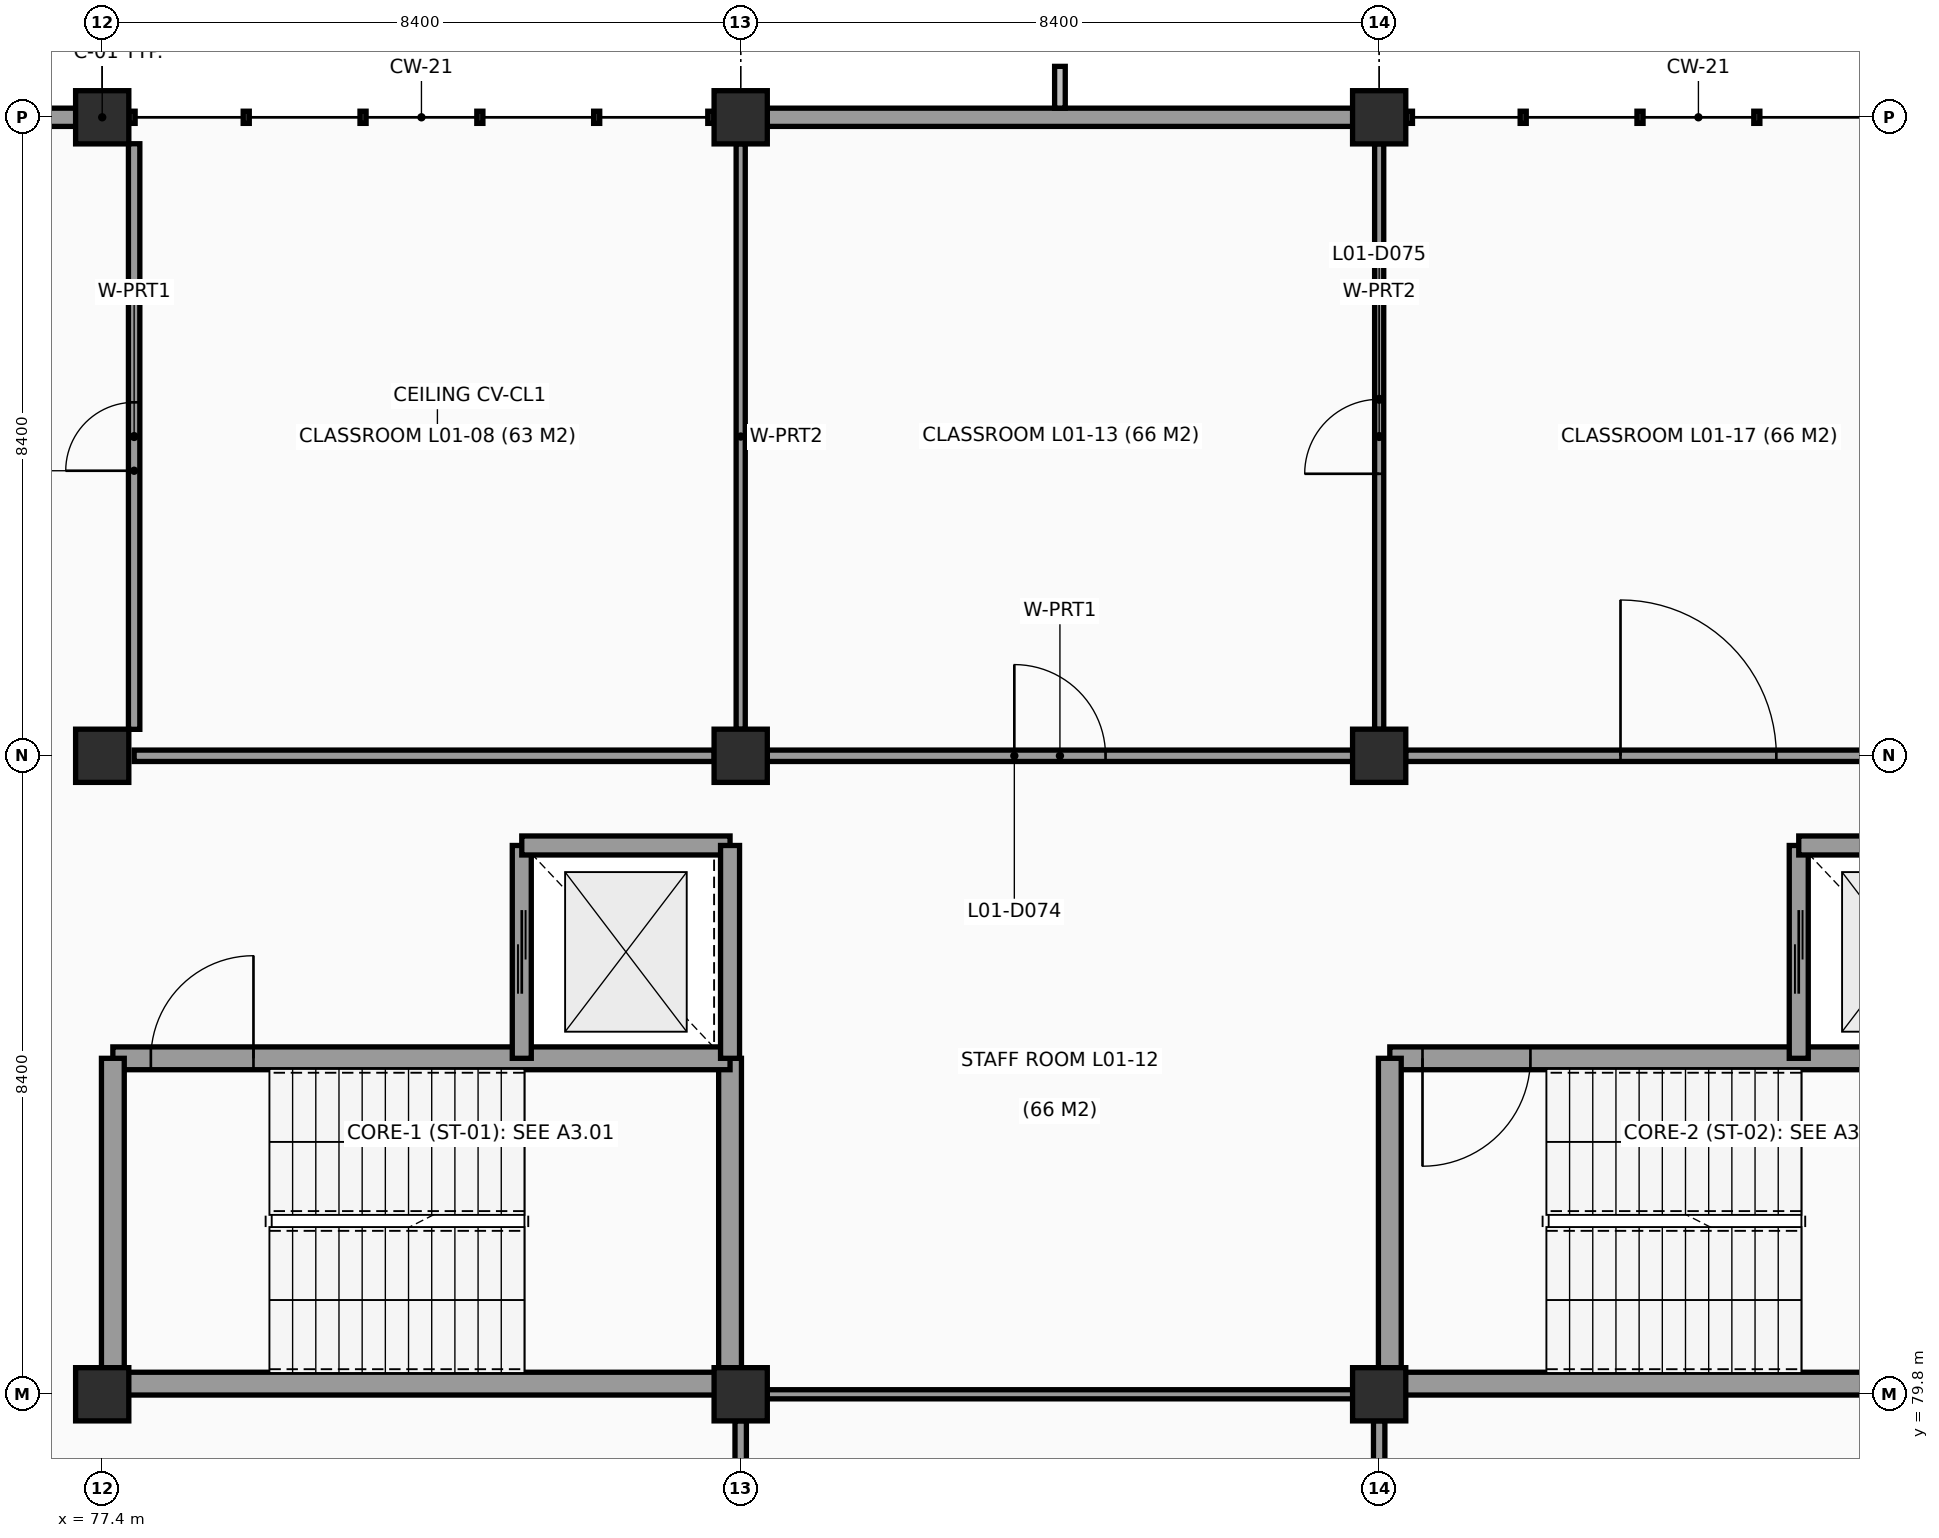
"""IFC4 building model, lengths in metres.
Left out: names, types, materials, properties, quantities, classifications, styles, units other than length and angle.
Written with IfcOpenShell. Run it as: python <this file> out.ifc"""

import sys

from ifc_helpers import new_model, si_unit, direction, frame, frame_2d, origin, origin_2d, place, context, subcontext, project, spatial, rectangle, extrude, element, fill, save


model = new_model("IFC4")
c1 = context("Model", 3, precision=1e-05, world=origin(), true_north=direction((0.0, 1.0)))
c2 = subcontext(c1, "Body", "Model", "MODEL_VIEW")
j1 = project(units=[si_unit("LENGTHUNIT", "METRE"), si_unit("PLANEANGLEUNIT", "RADIAN")], contexts=[c1])
p1 = place(None, origin())
s1 = spatial("IfcSite", under=j1, at=p1, CompositionType="ELEMENT")
p2 = place(p1, origin())
s2 = spatial("IfcBuilding", under=s1, at=p2, CompositionType="ELEMENT")
p3 = place(p2, frame((0.0, 0.0, 4.2)))
s3 = spatial("IfcBuildingStorey", under=s2, at=p3, CompositionType="ELEMENT", Elevation=4.2)
for number, where, z_axis, x_axis in (
    (1, (77.4, 79.8, 0.0), (0.0, 0.0, 1.0), (1.0, 0.0, 0.0)),
    (2, (77.4, 88.2, 0.0), (0.0, 0.0, 1.0), (1.0, 0.0, 0.0)),
    (3, (77.4, 96.6, 0.0), (0.0, 0.0, 1.0), (1.0, 0.0, 0.0)),
    (4, (85.8, 79.8, 0.0), (0.0, 0.0, 1.0), (1.0, 0.0, 0.0)),
    (5, (85.8, 88.2, 0.0), (0.0, 0.0, 1.0), (1.0, 0.0, 0.0)),
    (6, (85.8, 96.6, 0.0), (0.0, 0.0, 1.0), (1.0, 0.0, 0.0)),
    (7, (94.2, 79.8, 0.0), (0.0, 0.0, 1.0), (1.0, 0.0, 0.0)),
    (8, (94.2, 88.2, 0.0), (0.0, 0.0, 1.0), (1.0, 0.0, 0.0)),
    (9, (94.2, 96.6, 0.0), (0.0, 0.0, 1.0), (1.0, 0.0, 0.0)),
):
    element("IfcColumn", number, at=place(p3, frame(where, z_axis=z_axis, x_axis=x_axis)), inside=s3, PredefinedType="COLUMN", context=c2, shape_type="SweptSolid", body=[
        extrude(rectangle(XDim=0.7, YDim=0.7, at=origin_2d()), origin(), (0.0, 0.0, 1.0), 3.6),
    ])
p4 = place(p3, frame((74.723, 96.6, 0.0), z_axis=(0.0, 0.0, 1.0), x_axis=(1.0, 0.0, 0.0)))
e10 = element("IfcWall", 10, at=p4, inside=s3, PredefinedType="SOLIDWALL", context=c2, shape_type="SweptSolid", body=[
    extrude(rectangle(XDim=2.329, YDim=0.24, at=frame_2d((1.165, 0.0))), origin(), (0.0, 0.0, 1.0), 2.77),
])
p5 = place(p3, frame((86.148, 96.6, 0.0), z_axis=(0.0, 0.0, 1.0), x_axis=(1.0, 0.0, 0.0)))
e11 = element("IfcWall", 11, at=p5, inside=s3, PredefinedType="SOLIDWALL", context=c2, shape_type="SweptSolid", body=[
    extrude(rectangle(XDim=7.704, YDim=0.24, at=frame_2d((3.852, 0.0))), origin(), (0.0, 0.0, 1.0), 2.57),
])
p6 = place(p3, frame((77.54, 79.94, 0.0), z_axis=(0.0, 0.0, 1.0), x_axis=(1.0, 0.0, 0.0)))
e12 = element("IfcWall", 12, at=p6, inside=s3, PredefinedType="SHEAR", context=c2, shape_type="SweptSolid", body=[
    extrude(rectangle(XDim=8.12, YDim=0.3, at=frame_2d((4.06, 0.0))), origin(), (0.0, 0.0, 1.0), 3.6),
])
p7 = place(p3, frame((85.66, 79.94, 0.0), z_axis=(0.0, 0.0, 1.0), x_axis=(0.0, 1.0, 0.0)))
e13 = element("IfcWall", 13, at=p7, inside=s3, PredefinedType="SHEAR", context=c2, shape_type="SweptSolid", body=[
    extrude(rectangle(XDim=4.28, YDim=0.3, at=frame_2d((2.14, 0.0))), origin(), (0.0, 0.0, 1.0), 3.6),
])
p8 = place(p3, frame((85.66, 84.22, 0.0), z_axis=(0.0, 0.0, 1.0), x_axis=(-1.0, 0.0, 0.0)))
e14 = element("IfcWall", 14, at=p8, inside=s3, PredefinedType="SHEAR", context=c2, shape_type="SweptSolid", body=[
    extrude(rectangle(XDim=8.12, YDim=0.3, at=frame_2d((4.06, 0.0))), origin(), (0.0, 0.0, 1.0), 3.6),
])
p9 = place(p8, frame((6.27, 0.0, 0.0)))
e15 = element("IfcOpeningElement", 15, at=p9, cuts=e14, PredefinedType="OPENING", context=c2, shape_type="SweptSolid", body=[
    extrude(rectangle(XDim=1.35, YDim=2.15, at=frame_2d((0.675, 1.075))), frame((0.0, 0.16, 0.0), z_axis=(0.0, -1.0, 0.0), x_axis=(1.0, 0.0, 0.0)), (0.0, 0.0, 1.0), 0.32),
])
p10 = place(p3, frame((77.54, 84.22, 0.0), z_axis=(0.0, 0.0, 1.0), x_axis=(0.0, -1.0, 0.0)))
e16 = element("IfcWall", 16, at=p10, inside=s3, PredefinedType="SHEAR", context=c2, shape_type="SweptSolid", body=[
    extrude(rectangle(XDim=4.28, YDim=0.3, at=frame_2d((2.14, 0.0))), origin(), (0.0, 0.0, 1.0), 3.6),
])
p11 = place(p3, frame((82.92, 87.02, 0.0), z_axis=(0.0, 0.0, 1.0), x_axis=(0.0, -1.0, 0.0)))
e17 = element("IfcWall", 17, at=p11, inside=s3, PredefinedType="SHEAR", context=c2, shape_type="SweptSolid", body=[
    extrude(rectangle(XDim=2.8, YDim=0.25, at=frame_2d((1.4, 0.0))), origin(), (0.0, 0.0, 1.0), 3.6),
])
p12 = place(p11, frame((0.85, 0.0, 0.0)))
e18 = element("IfcOpeningElement", 18, at=p12, cuts=e17, PredefinedType="OPENING", context=c2, shape_type="SweptSolid", body=[
    extrude(rectangle(XDim=1.1, YDim=2.15, at=frame_2d((0.55, 1.075))), frame((0.0, 0.135, 0.0), z_axis=(0.0, -1.0, 0.0), x_axis=(1.0, 0.0, 0.0)), (0.0, 0.0, 1.0), 0.27),
])
p13 = place(p3, frame((85.66, 87.02, 0.0), z_axis=(0.0, 0.0, 1.0), x_axis=(-1.0, 0.0, 0.0)))
e19 = element("IfcWall", 19, at=p13, inside=s3, PredefinedType="SHEAR", context=c2, shape_type="SweptSolid", body=[
    extrude(rectangle(XDim=2.74, YDim=0.25, at=frame_2d((1.37, 0.0))), origin(), (0.0, 0.0, 1.0), 3.6),
])
p14 = place(p3, frame((85.66, 84.22, 0.0), z_axis=(0.0, 0.0, 1.0), x_axis=(0.0, 1.0, 0.0)))
e20 = element("IfcWall", 20, at=p14, inside=s3, PredefinedType="SHEAR", context=c2, shape_type="SweptSolid", body=[
    extrude(rectangle(XDim=2.8, YDim=0.25, at=frame_2d((1.4, 0.0))), origin(), (0.0, 0.0, 1.0), 3.6),
])
p15 = place(p3, frame((94.34, 79.94, 0.0), z_axis=(0.0, 0.0, 1.0), x_axis=(1.0, 0.0, 0.0)))
e21 = element("IfcWall", 21, at=p15, inside=s3, PredefinedType="SHEAR", context=c2, shape_type="SweptSolid", body=[
    extrude(rectangle(XDim=8.12, YDim=0.3, at=frame_2d((4.06, 0.0))), origin(), (0.0, 0.0, 1.0), 3.6),
])
p16 = place(p3, frame((102.46, 84.22, 0.0), z_axis=(0.0, 0.0, 1.0), x_axis=(-1.0, 0.0, 0.0)))
e22 = element("IfcWall", 22, at=p16, inside=s3, PredefinedType="SHEAR", context=c2, shape_type="SweptSolid", body=[
    extrude(rectangle(XDim=8.12, YDim=0.3, at=frame_2d((4.06, 0.0))), origin(), (0.0, 0.0, 1.0), 3.6),
])
p17 = place(p16, frame((6.27, 0.0, 0.0)))
e23 = element("IfcOpeningElement", 23, at=p17, cuts=e22, PredefinedType="OPENING", context=c2, shape_type="SweptSolid", body=[
    extrude(rectangle(XDim=1.42, YDim=2.15, at=frame_2d((0.71, 1.075))), frame((0.0, 0.16, 0.0), z_axis=(0.0, -1.0, 0.0), x_axis=(1.0, 0.0, 0.0)), (0.0, 0.0, 1.0), 0.32),
])
p18 = place(p3, frame((94.34, 84.22, 0.0), z_axis=(0.0, 0.0, 1.0), x_axis=(0.0, -1.0, 0.0)))
e24 = element("IfcWall", 24, at=p18, inside=s3, PredefinedType="SHEAR", context=c2, shape_type="SweptSolid", body=[
    extrude(rectangle(XDim=4.28, YDim=0.3, at=frame_2d((2.14, 0.0))), origin(), (0.0, 0.0, 1.0), 3.6),
])
p19 = place(p3, frame((99.72, 87.02, 0.0), z_axis=(0.0, 0.0, 1.0), x_axis=(0.0, -1.0, 0.0)))
e25 = element("IfcWall", 25, at=p19, inside=s3, PredefinedType="SHEAR", context=c2, shape_type="SweptSolid", body=[
    extrude(rectangle(XDim=2.8, YDim=0.25, at=frame_2d((1.4, 0.0))), origin(), (0.0, 0.0, 1.0), 3.6),
])
p20 = place(p19, frame((0.85, 0.0, 0.0)))
e26 = element("IfcOpeningElement", 26, at=p20, cuts=e25, PredefinedType="OPENING", context=c2, shape_type="SweptSolid", body=[
    extrude(rectangle(XDim=1.1, YDim=2.15, at=frame_2d((0.55, 1.075))), frame((0.0, 0.135, 0.0), z_axis=(0.0, -1.0, 0.0), x_axis=(1.0, 0.0, 0.0)), (0.0, 0.0, 1.0), 0.27),
])
p21 = place(p3, frame((102.46, 87.02, 0.0), z_axis=(0.0, 0.0, 1.0), x_axis=(-1.0, 0.0, 0.0)))
e27 = element("IfcWall", 27, at=p21, inside=s3, PredefinedType="SHEAR", context=c2, shape_type="SweptSolid", body=[
    extrude(rectangle(XDim=2.74, YDim=0.25, at=frame_2d((1.37, 0.0))), origin(), (0.0, 0.0, 1.0), 3.6),
])
p22 = place(p3, frame((77.82, 88.548, 0.0), z_axis=(0.0, 0.0, 1.0), x_axis=(0.0, 1.0, 0.0)))
e28 = element("IfcWall", 28, at=p22, inside=s3, PredefinedType="PARTITIONING", context=c2, shape_type="SweptSolid", body=[
    extrude(rectangle(XDim=7.704, YDim=0.15, at=frame_2d((3.852, 0.0))), origin(), (0.0, 0.0, 1.0), 2.82),
])
p23 = place(p22, frame((3.402, 0.0, 0.0)))
e29 = element("IfcOpeningElement", 29, at=p23, cuts=e28, PredefinedType="OPENING", context=c2, shape_type="SweptSolid", body=[
    extrude(rectangle(XDim=0.9, YDim=2.05, at=frame_2d((0.45, 1.025))), frame((0.0, 0.085, 0.0), z_axis=(0.0, -1.0, 0.0), x_axis=(1.0, 0.0, 0.0)), (0.0, 0.0, 1.0), 0.17),
])
p24 = place(p3, frame((85.8, 96.252, 0.0), z_axis=(0.0, 0.0, 1.0), x_axis=(0.0, -1.0, 0.0)))
e30 = element("IfcWall", 30, at=p24, inside=s3, PredefinedType="PARTITIONING", context=c2, shape_type="SweptSolid", body=[
    extrude(rectangle(XDim=7.704, YDim=0.12, at=frame_2d((3.852, 0.0))), origin(), (0.0, 0.0, 1.0), 2.92),
])
p25 = place(p3, frame((85.452, 88.2, 0.0), z_axis=(0.0, 0.0, 1.0), x_axis=(-1.0, 0.0, 0.0)))
e31 = element("IfcWall", 31, at=p25, inside=s3, PredefinedType="PARTITIONING", context=c2, shape_type="SweptSolid", body=[
    extrude(rectangle(XDim=7.632, YDim=0.15, at=frame_2d((3.816, 0.0))), origin(), (0.0, 0.0, 1.0), 2.93),
])
p26 = place(p3, frame((85.8, 73.8, 0.0), z_axis=(0.0, 0.0, 1.0), x_axis=(0.0, 1.0, 0.0)))
e32 = element("IfcWall", 32, at=p26, inside=s3, PredefinedType="PARTITIONING", context=c2, shape_type="SweptSolid", body=[
    extrude(rectangle(XDim=5.652, YDim=0.15, at=frame_2d((2.826, 0.0))), origin(), (0.0, 0.0, 1.0), 2.92),
])
p27 = place(p26, frame((2.301, 0.0, 0.0)))
e33 = element("IfcOpeningElement", 33, at=p27, cuts=e32, PredefinedType="OPENING", context=c2, shape_type="SweptSolid", body=[
    extrude(rectangle(XDim=1.05, YDim=2.15, at=frame_2d((0.525, 1.075))), frame((0.0, 0.085, 0.0), z_axis=(0.0, -1.0, 0.0), x_axis=(1.0, 0.0, 0.0)), (0.0, 0.0, 1.0), 0.17),
])
p28 = place(p3, frame((86.148, 79.8, 0.0), z_axis=(0.0, 0.0, 1.0), x_axis=(1.0, 0.0, 0.0)))
e34 = element("IfcWall", 34, at=p28, inside=s3, PredefinedType="PARTITIONING", context=c2, shape_type="SweptSolid", body=[
    extrude(rectangle(XDim=7.704, YDim=0.12, at=frame_2d((3.852, 0.0))), origin(), (0.0, 0.0, 1.0), 2.87),
])
p29 = place(p3, frame((94.2, 79.452, 0.0), z_axis=(0.0, 0.0, 1.0), x_axis=(0.0, -1.0, 0.0)))
e35 = element("IfcWall", 35, at=p29, inside=s3, PredefinedType="PARTITIONING", context=c2, shape_type="SweptSolid", body=[
    extrude(rectangle(XDim=5.652, YDim=0.15, at=frame_2d((2.826, 0.0))), origin(), (0.0, 0.0, 1.0), 2.96),
])
p30 = place(p3, frame((86.148, 88.2, 0.0), z_axis=(0.0, 0.0, 1.0), x_axis=(1.0, 0.0, 0.0)))
e36 = element("IfcWall", 36, at=p30, inside=s3, PredefinedType="PARTITIONING", context=c2, shape_type="SweptSolid", body=[
    extrude(rectangle(XDim=7.704, YDim=0.15, at=frame_2d((3.852, 0.0))), origin(), (0.0, 0.0, 1.0), 2.93),
])
p31 = place(p30, frame((3.252, 0.0, 0.0)))
e37 = element("IfcOpeningElement", 37, at=p31, cuts=e36, PredefinedType="OPENING", context=c2, shape_type="SweptSolid", body=[
    extrude(rectangle(XDim=1.2, YDim=2.15, at=frame_2d((0.6, 1.075))), frame((0.0, 0.085, 0.0), z_axis=(0.0, -1.0, 0.0), x_axis=(1.0, 0.0, 0.0)), (0.0, 0.0, 1.0), 0.17),
])
p32 = place(p3, frame((94.2, 96.252, 0.0), z_axis=(0.0, 0.0, 1.0), x_axis=(0.0, -1.0, 0.0)))
e38 = element("IfcWall", 38, at=p32, inside=s3, PredefinedType="PARTITIONING", context=c2, shape_type="SweptSolid", body=[
    extrude(rectangle(XDim=7.704, YDim=0.12, at=frame_2d((3.852, 0.0))), origin(), (0.0, 0.0, 1.0), 2.96),
])
p33 = place(p32, frame((3.362, 0.0, 0.0)))
e39 = element("IfcOpeningElement", 39, at=p33, cuts=e38, PredefinedType="OPENING", context=c2, shape_type="SweptSolid", body=[
    extrude(rectangle(XDim=0.98, YDim=2.12, at=frame_2d((0.49, 1.06))), frame((0.0, 0.07, 0.0), z_axis=(0.0, -1.0, 0.0), x_axis=(1.0, 0.0, 0.0)), (0.0, 0.0, 1.0), 0.14),
])
p34 = place(p3, frame((102.252, 88.2, 0.0), z_axis=(0.0, 0.0, 1.0), x_axis=(-1.0, 0.0, 0.0)))
e40 = element("IfcWall", 40, at=p34, inside=s3, PredefinedType="PARTITIONING", context=c2, shape_type="SweptSolid", body=[
    extrude(rectangle(XDim=7.704, YDim=0.15, at=frame_2d((3.852, 0.0))), origin(), (0.0, 0.0, 1.0), 2.93),
])
p35 = place(p34, frame((2.827, 0.0, 0.0)))
e41 = element("IfcOpeningElement", 41, at=p35, cuts=e40, PredefinedType="OPENING", context=c2, shape_type="SweptSolid", body=[
    extrude(rectangle(XDim=2.05, YDim=2.35, at=frame_2d((1.025, 1.175))), frame((0.0, 0.085, 0.0), z_axis=(0.0, -1.0, 0.0), x_axis=(1.0, 0.0, 0.0)), (0.0, 0.0, 1.0), 0.17),
])
p36 = place(p9, frame((1.35, 0.0, 0.0), z_axis=(0.0, 0.0, 1.0), x_axis=(-1.0, 0.0, 0.0)))
e42 = element("IfcDoor", 42, at=p36, inside=s3, OperationType="SINGLE_SWING_LEFT", PredefinedType="DOOR", context=c2, shape_type="SweptSolid", body=[
    extrude(rectangle(XDim=1.35, YDim=2.15, at=frame_2d((0.675, 1.075))), frame((0.0, 0.025, 0.0), z_axis=(0.0, -1.0, 0.0), x_axis=(1.0, 0.0, 0.0)), (0.0, 0.0, 1.0), 0.05),
])
fill(e15, e42)
p37 = place(p12, origin())
e43 = element("IfcDoor", 43, at=p37, inside=s3, OperationType="DOUBLE_DOOR_SLIDING", PredefinedType="DOOR", context=c2, shape_type="SweptSolid", body=[
    extrude(rectangle(XDim=1.1, YDim=2.15, at=frame_2d((0.55, 1.075))), frame((0.0, 0.025, 0.0), z_axis=(0.0, -1.0, 0.0), x_axis=(1.0, 0.0, 0.0)), (0.0, 0.0, 1.0), 0.05),
])
fill(e18, e43)
p38 = place(p17, frame((1.42, 0.0, 0.0), z_axis=(0.0, 0.0, 1.0), x_axis=(-1.0, 0.0, 0.0)))
e44 = element("IfcDoor", 44, at=p38, inside=s3, OperationType="SINGLE_SWING_RIGHT", PredefinedType="DOOR", context=c2, shape_type="SweptSolid", body=[
    extrude(rectangle(XDim=1.42, YDim=2.15, at=frame_2d((0.71, 1.075))), frame((0.0, 0.025, 0.0), z_axis=(0.0, -1.0, 0.0), x_axis=(1.0, 0.0, 0.0)), (0.0, 0.0, 1.0), 0.05),
])
fill(e23, e44)
p39 = place(p20, origin())
e45 = element("IfcDoor", 45, at=p39, inside=s3, OperationType="DOUBLE_DOOR_SLIDING", PredefinedType="DOOR", context=c2, shape_type="SweptSolid", body=[
    extrude(rectangle(XDim=1.1, YDim=2.15, at=frame_2d((0.55, 1.075))), frame((0.0, 0.025, 0.0), z_axis=(0.0, -1.0, 0.0), x_axis=(1.0, 0.0, 0.0)), (0.0, 0.0, 1.0), 0.05),
])
fill(e26, e45)
p40 = place(p23, origin())
e46 = element("IfcDoor", 46, at=p40, inside=s3, OperationType="SINGLE_SWING_LEFT", PredefinedType="DOOR", context=c2, shape_type="SweptSolid", body=[
    extrude(rectangle(XDim=0.9, YDim=2.05, at=frame_2d((0.45, 1.025))), frame((0.0, 0.025, 0.0), z_axis=(0.0, -1.0, 0.0), x_axis=(1.0, 0.0, 0.0)), (0.0, 0.0, 1.0), 0.05),
])
fill(e29, e46)
p41 = place(p31, origin())
e47 = element("IfcDoor", 47, at=p41, inside=s3, OperationType="SINGLE_SWING_LEFT", PredefinedType="DOOR", context=c2, shape_type="SweptSolid", body=[
    extrude(rectangle(XDim=1.2, YDim=2.15, at=frame_2d((0.6, 1.075))), frame((0.0, 0.025, 0.0), z_axis=(0.0, -1.0, 0.0), x_axis=(1.0, 0.0, 0.0)), (0.0, 0.0, 1.0), 0.05),
])
fill(e37, e47)
p42 = place(p33, origin())
e48 = element("IfcDoor", 48, at=p42, inside=s3, OperationType="SINGLE_SWING_RIGHT", PredefinedType="DOOR", context=c2, shape_type="SweptSolid", body=[
    extrude(rectangle(XDim=0.98, YDim=2.12, at=frame_2d((0.49, 1.06))), frame((0.0, 0.025, 0.0), z_axis=(0.0, -1.0, 0.0), x_axis=(1.0, 0.0, 0.0)), (0.0, 0.0, 1.0), 0.05),
])
fill(e39, e48)
p43 = place(p35, origin())
e49 = element("IfcDoor", 49, at=p43, inside=s3, OperationType="DOUBLE_DOOR_SINGLE_SWING", PredefinedType="DOOR", context=c2, shape_type="SweptSolid", body=[
    extrude(rectangle(XDim=2.05, YDim=2.35, at=frame_2d((1.025, 1.175))), frame((0.0, 0.025, 0.0), z_axis=(0.0, -1.0, 0.0), x_axis=(1.0, 0.0, 0.0)), (0.0, 0.0, 1.0), 0.05),
])
fill(e41, e49)
save(model, sys.argv[1])
